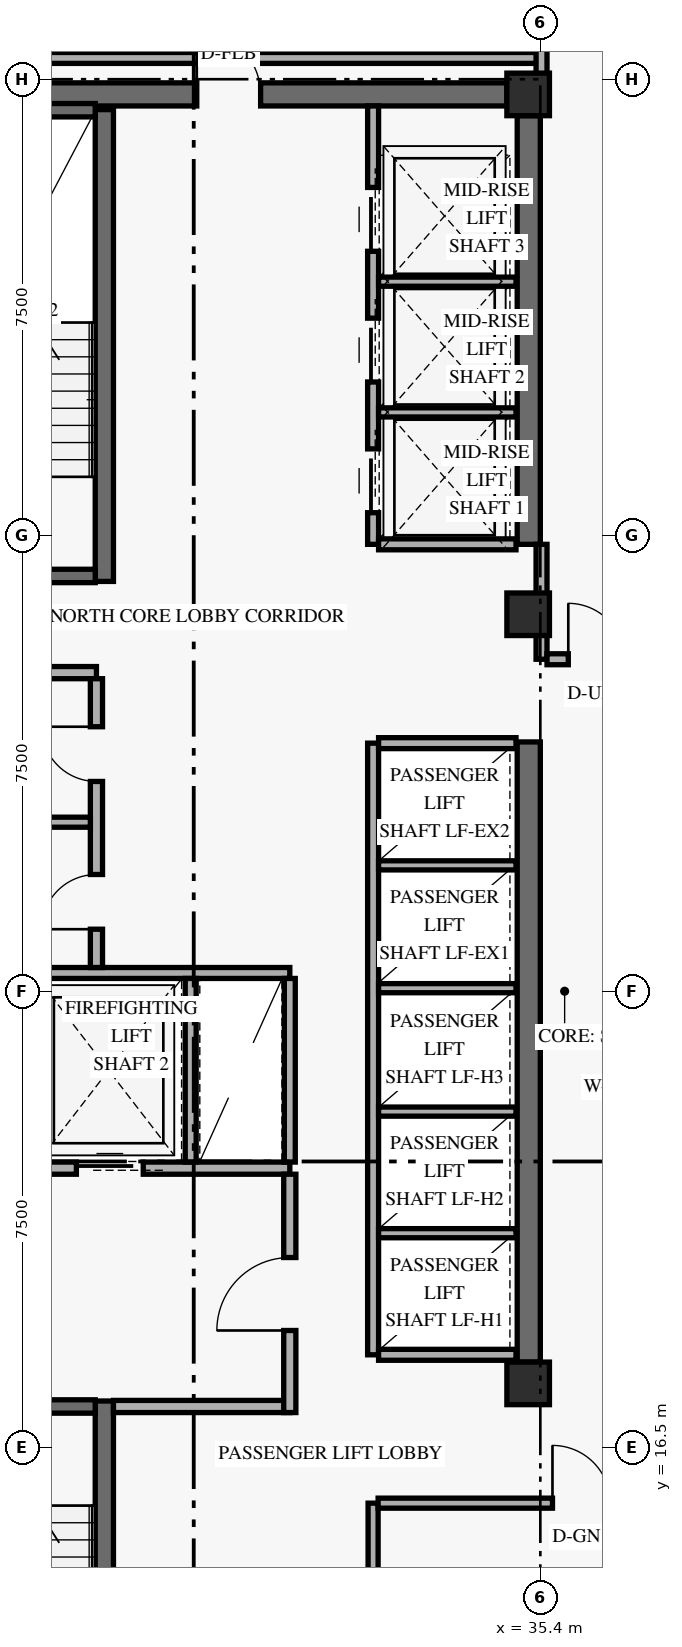
"""IFC4 building model, lengths in metres.
Left out: names, types, materials, properties, quantities, classifications, styles, units other than length and angle.
Written with IfcOpenShell. Run it as: python <this file> out.ifc"""

import sys

from ifc_helpers import new_model, si_unit, direction, frame, frame_2d, origin, origin_2d, place, context, subcontext, project, spatial, rectangle, extrude, element, fill, save


model = new_model("IFC4")
c1 = context("Model", 3, precision=1e-05, world=origin(), true_north=direction((0.0, 1.0)))
c2 = subcontext(c1, "Body", "Model", "MODEL_VIEW")
j1 = project(units=[si_unit("LENGTHUNIT", "METRE"), si_unit("PLANEANGLEUNIT", "RADIAN")], contexts=[c1])
p1 = place(None, origin())
s1 = spatial("IfcSite", under=j1, at=p1, CompositionType="ELEMENT")
p2 = place(p1, origin())
s2 = spatial("IfcBuilding", under=s1, at=p2, CompositionType="ELEMENT")
p3 = place(p2, frame((0.0, 0.0, 159.0)))
s3 = spatial("IfcBuildingStorey", under=s2, at=p3, CompositionType="ELEMENT", Elevation=159.0)
p4 = place(p3, frame((35.21, 17.9, 0.0), z_axis=(0.0, 0.0, 1.0), x_axis=(0.0, 1.0, 0.0)))
e1 = element("IfcWall", 1, at=p4, inside=s3, PredefinedType="SHEAR", context=c2, shape_type="SweptSolid", body=[
    extrude(rectangle(XDim=10.2, YDim=0.38, at=frame_2d((5.1, 0.0))), origin(), (0.0, 0.0, 1.0), 2.748),
])
p5 = place(p3, frame((35.21, 31.35, 0.0), z_axis=(0.0, 0.0, 1.0), x_axis=(0.0, 1.0, 0.0)))
e2 = element("IfcWall", 2, at=p5, inside=s3, PredefinedType="SHEAR", context=c2, shape_type="SweptSolid", body=[
    extrude(rectangle(XDim=7.05, YDim=0.38, at=frame_2d((3.525, 0.0))), origin(), (0.0, 0.0, 1.0), 2.748),
])
p6 = place(p3, frame((24.55, 38.75, 0.0), z_axis=(0.0, 0.0, 1.0), x_axis=(1.0, 0.0, 0.0)))
e3 = element("IfcWall", 3, at=p6, inside=s3, PredefinedType="SHEAR", context=c2, shape_type="SweptSolid", body=[
    extrude(rectangle(XDim=10.3, YDim=0.38, at=frame_2d((5.15, 0.0))), origin(), (0.0, 0.0, 1.0), 3.36),
])
p7 = place(p6, frame((5.2, 0.0, 0.0)))
e4 = element("IfcOpeningElement", 4, at=p7, cuts=e3, PredefinedType="OPENING", context=c2, shape_type="SweptSolid", body=[
    extrude(rectangle(XDim=1.05, YDim=2.15, at=frame_2d((0.525, 1.075))), frame((0.0, 0.2, 0.0), z_axis=(0.0, -1.0, 0.0), x_axis=(1.0, 0.0, 0.0)), (0.0, 0.0, 1.0), 0.4),
])
p8 = place(p3, frame((28.23, 9.5, 0.0), z_axis=(0.0, 0.0, 1.0), x_axis=(0.0, 1.0, 0.0)))
e5 = element("IfcWall", 5, at=p8, inside=s3, PredefinedType="SHEAR", context=c2, shape_type="SweptSolid", body=[
    extrude(rectangle(XDim=7.76, YDim=0.3, at=frame_2d((3.88, 0.0))), origin(), (0.0, 0.0, 1.0), 3.36),
])
p9 = place(p3, frame((24.92, 17.17, 0.0), z_axis=(0.0, 0.0, 1.0), x_axis=(1.0, 0.0, 0.0)))
e6 = element("IfcWall", 6, at=p9, inside=s3, PredefinedType="SHEAR", context=c2, shape_type="SweptSolid", body=[
    extrude(rectangle(XDim=3.16, YDim=0.22, at=frame_2d((1.58, 0.0))), origin(), (0.0, 0.0, 1.0), 3.36),
])
p10 = place(p9, frame((0.78, 0.0, 0.0)))
e7 = element("IfcOpeningElement", 7, at=p10, cuts=e6, PredefinedType="OPENING", context=c2, shape_type="SweptSolid", body=[
    extrude(rectangle(XDim=1.05, YDim=2.15, at=frame_2d((0.525, 1.075))), frame((0.0, 0.12, 0.0), z_axis=(0.0, -1.0, 0.0), x_axis=(1.0, 0.0, 0.0)), (0.0, 0.0, 1.0), 0.24),
])
p11 = place(p3, frame((28.23, 30.74, 0.0), z_axis=(0.0, 0.0, 1.0), x_axis=(0.0, 1.0, 0.0)))
e8 = element("IfcWall", 8, at=p11, inside=s3, PredefinedType="SHEAR", context=c2, shape_type="SweptSolid", body=[
    extrude(rectangle(XDim=7.76, YDim=0.3, at=frame_2d((3.88, 0.0))), origin(), (0.0, 0.0, 1.0), 3.36),
])
p12 = place(p3, frame((24.92, 30.83, 0.0), z_axis=(0.0, 0.0, 1.0), x_axis=(1.0, 0.0, 0.0)))
e9 = element("IfcWall", 9, at=p12, inside=s3, PredefinedType="SHEAR", context=c2, shape_type="SweptSolid", body=[
    extrude(rectangle(XDim=3.16, YDim=0.22, at=frame_2d((1.58, 0.0))), origin(), (0.0, 0.0, 1.0), 3.36),
])
p13 = place(p12, frame((0.78, 0.0, 0.0)))
e10 = element("IfcOpeningElement", 10, at=p13, cuts=e9, PredefinedType="OPENING", context=c2, shape_type="SweptSolid", body=[
    extrude(rectangle(XDim=1.05, YDim=2.15, at=frame_2d((0.525, 1.075))), frame((0.0, 0.12, 0.0), z_axis=(0.0, -1.0, 0.0), x_axis=(1.0, 0.0, 0.0)), (0.0, 0.0, 1.0), 0.24),
])
p14 = place(p3, frame((24.92, 38.49, 0.0), z_axis=(0.0, 0.0, 1.0), x_axis=(1.0, 0.0, 0.0)))
e11 = element("IfcWall", 11, at=p14, inside=s3, PredefinedType="SHEAR", context=c2, shape_type="SweptSolid", body=[
    extrude(rectangle(XDim=3.16, YDim=0.22, at=frame_2d((1.58, 0.0))), origin(), (0.0, 0.0, 1.0), 3.36),
])
for number, where, z_axis, x_axis in (
    (12, (35.2, 17.55, 0.0), (0.0, 0.0, 1.0), (1.0, 0.0, 0.0)),
    (13, (35.2, 30.2, 0.0), (0.0, 0.0, 1.0), (1.0, 0.0, 0.0)),
    (14, (35.2, 38.75, 0.0), (0.0, 0.0, 1.0), (1.0, 0.0, 0.0)),
):
    element("IfcColumn", number, at=place(p3, frame(where, z_axis=z_axis, x_axis=x_axis)), inside=s3, PredefinedType="COLUMN", context=c2, shape_type="SweptSolid", body=[
        extrude(rectangle(XDim=0.7, YDim=0.7, at=origin_2d()), origin(), (0.0, 0.0, 1.0), 3.6),
    ])
p15 = place(p3, frame((24.45, 21.09, 0.0), z_axis=(0.0, 0.0, 1.0), x_axis=(1.0, 0.0, 0.0)))
e15 = element("IfcWall", 15, at=p15, inside=s3, PredefinedType="STANDARD", context=c2, shape_type="SweptSolid", body=[
    extrude(rectangle(XDim=6.83, YDim=0.2, at=frame_2d((3.415, 0.0))), origin(), (0.0, 0.0, 1.0), 3.36),
])
p16 = place(p15, frame((0.72, 0.0, 0.0)))
e16 = element("IfcOpeningElement", 16, at=p16, cuts=e15, PredefinedType="OPENING", context=c2, shape_type="SweptSolid", body=[
    extrude(rectangle(XDim=1.1, YDim=2.2, at=frame_2d((0.55, 1.1))), frame((0.0, 0.11, 0.0), z_axis=(0.0, -1.0, 0.0), x_axis=(1.0, 0.0, 0.0)), (0.0, 0.0, 1.0), 0.22),
])
p17 = place(p15, frame((3.32, 0.0, 0.0)))
e17 = element("IfcOpeningElement", 17, at=p17, cuts=e15, PredefinedType="OPENING", context=c2, shape_type="SweptSolid", body=[
    extrude(rectangle(XDim=1.1, YDim=2.2, at=frame_2d((0.55, 1.1))), frame((0.0, 0.11, 0.0), z_axis=(0.0, -1.0, 0.0), x_axis=(1.0, 0.0, 0.0)), (0.0, 0.0, 1.0), 0.22),
])
p18 = place(p3, frame((28.38, 17.17, 0.0), z_axis=(0.0, 0.0, 1.0), x_axis=(1.0, 0.0, 0.0)))
e18 = element("IfcWall", 18, at=p18, inside=s3, PredefinedType="STANDARD", context=c2, shape_type="SweptSolid", body=[
    extrude(rectangle(XDim=2.9, YDim=0.2, at=frame_2d((1.45, 0.0))), origin(), (0.0, 0.0, 1.0), 3.36),
])
p19 = place(p3, frame((31.28, 17.07, 0.0), z_axis=(0.0, 0.0, 1.0), x_axis=(0.0, 1.0, 0.0)))
e19 = element("IfcWall", 19, at=p19, inside=s3, PredefinedType="STANDARD", context=c2, shape_type="SweptSolid", body=[
    extrude(rectangle(XDim=3.92, YDim=0.2, at=frame_2d((1.96, 0.0))), origin(), (0.0, 0.0, 1.0), 2.73),
])
p20 = place(p19, frame((1.35, 0.0, 0.0)))
e20 = element("IfcOpeningElement", 20, at=p20, cuts=e19, PredefinedType="OPENING", context=c2, shape_type="SweptSolid", body=[
    extrude(rectangle(XDim=1.2, YDim=2.15, at=frame_2d((0.6, 1.075))), frame((0.0, 0.11, 0.0), z_axis=(0.0, -1.0, 0.0), x_axis=(1.0, 0.0, 0.0)), (0.0, 0.0, 1.0), 0.22),
])
p21 = place(p3, frame((24.45, 24.3, 0.0), z_axis=(0.0, 0.0, 1.0), x_axis=(1.0, 0.0, 0.0)))
e21 = element("IfcWall", 21, at=p21, inside=s3, PredefinedType="STANDARD", context=c2, shape_type="SweptSolid", body=[
    extrude(rectangle(XDim=6.83, YDim=0.18, at=frame_2d((3.415, 0.0))), origin(), (0.0, 0.0, 1.0), 3.36),
])
for number, where, z_axis, x_axis in (
    (22, (29.65, 21.19, 0.0), (0.0, 0.0, 1.0), (0.0, 1.0, 0.0)),
    (23, (31.28, 21.19, 0.0), (0.0, 0.0, 1.0), (0.0, 1.0, 0.0)),
):
    element("IfcWall", number, at=place(p3, frame(where, z_axis=z_axis, x_axis=x_axis)), inside=s3, PredefinedType="STANDARD", context=c2, shape_type="SweptSolid", body=[
        extrude(rectangle(XDim=3.02, YDim=0.18, at=frame_2d((1.51, 0.0))), origin(), (0.0, 0.0, 1.0), 3.36),
    ])
p22 = place(p3, frame((24.45, 29.24, 0.0), z_axis=(0.0, 0.0, 1.0), x_axis=(1.0, 0.0, 0.0)))
e24 = element("IfcWall", 24, at=p22, inside=s3, PredefinedType="STANDARD", context=c2, shape_type="SweptSolid", body=[
    extrude(rectangle(XDim=3.65, YDim=0.2, at=frame_2d((1.825, 0.0))), origin(), (0.0, 0.0, 1.0), 3.36),
])
p23 = place(p3, frame((28.1, 24.39, 0.0), z_axis=(0.0, 0.0, 1.0), x_axis=(0.0, 1.0, 0.0)))
e25 = element("IfcWall", 25, at=p23, inside=s3, PredefinedType="STANDARD", context=c2, shape_type="SweptSolid", body=[
    extrude(rectangle(XDim=4.75, YDim=0.2, at=frame_2d((2.375, 0.0))), origin(), (0.0, 0.0, 1.0), 3.36),
])
p24 = place(p23, frame((0.63, 0.0, 0.0)))
e26 = element("IfcOpeningElement", 26, at=p24, cuts=e25, PredefinedType="OPENING", context=c2, shape_type="SweptSolid", body=[
    extrude(rectangle(XDim=0.9, YDim=2.1, at=frame_2d((0.45, 1.05))), frame((0.0, 0.11, 0.0), z_axis=(0.0, -1.0, 0.0), x_axis=(1.0, 0.0, 0.0)), (0.0, 0.0, 1.0), 0.22),
])
p25 = place(p23, frame((3.06, 0.0, 0.0)))
e27 = element("IfcOpeningElement", 27, at=p25, cuts=e25, PredefinedType="OPENING", context=c2, shape_type="SweptSolid", body=[
    extrude(rectangle(XDim=0.9, YDim=2.1, at=frame_2d((0.45, 1.05))), frame((0.0, 0.11, 0.0), z_axis=(0.0, -1.0, 0.0), x_axis=(1.0, 0.0, 0.0)), (0.0, 0.0, 1.0), 0.22),
])
p26 = place(p3, frame((24.45, 26.78, 0.0), z_axis=(0.0, 0.0, 1.0), x_axis=(1.0, 0.0, 0.0)))
e28 = element("IfcWall", 28, at=p26, inside=s3, PredefinedType="PARTITIONING", context=c2, shape_type="SweptSolid", body=[
    extrude(rectangle(XDim=3.55, YDim=0.165, at=frame_2d((1.775, 0.0))), origin(), (0.0, 0.0, 1.0), 3.36),
])
p27 = place(p3, frame((32.65, 18.02, 0.0), z_axis=(0.0, 0.0, 1.0), x_axis=(0.0, 1.0, 0.0)))
e29 = element("IfcWall", 29, at=p27, inside=s3, PredefinedType="STANDARD", context=c2, shape_type="SweptSolid", body=[
    extrude(rectangle(XDim=10.06, YDim=0.18, at=frame_2d((5.03, 0.0))), origin(), (0.0, 0.0, 1.0), 3.36),
])
for number, where, z_axis, x_axis in (
    (30, (32.74, 18.02, 0.0), (0.0, 0.0, 1.0), (1.0, 0.0, 0.0)),
    (31, (32.74, 28.08, 0.0), (0.0, 0.0, 1.0), (1.0, 0.0, 0.0)),
):
    element("IfcWall", number, at=place(p3, frame(where, z_axis=z_axis, x_axis=x_axis)), inside=s3, PredefinedType="STANDARD", context=c2, shape_type="SweptSolid", body=[
        extrude(rectangle(XDim=2.26, YDim=0.18, at=frame_2d((1.13, 0.0))), origin(), (0.0, 0.0, 1.0), 3.36),
    ])
for number, where, z_axis, x_axis in (
    (32, (32.74, 20.02, 0.0), (0.0, 0.0, 1.0), (1.0, 0.0, 0.0)),
    (33, (32.74, 22.02, 0.0), (0.0, 0.0, 1.0), (1.0, 0.0, 0.0)),
    (34, (32.74, 24.05, 0.0), (0.0, 0.0, 1.0), (1.0, 0.0, 0.0)),
    (35, (32.74, 26.07, 0.0), (0.0, 0.0, 1.0), (1.0, 0.0, 0.0)),
):
    element("IfcWall", number, at=place(p3, frame(where, z_axis=z_axis, x_axis=x_axis)), inside=s3, PredefinedType="STANDARD", context=c2, shape_type="SweptSolid", body=[
        extrude(rectangle(XDim=2.26, YDim=0.15, at=frame_2d((1.13, 0.0))), origin(), (0.0, 0.0, 1.0), 3.36),
    ])
p28 = place(p3, frame((32.65, 31.35, 0.0), z_axis=(0.0, 0.0, 1.0), x_axis=(0.0, 1.0, 0.0)))
e36 = element("IfcWall", 36, at=p28, inside=s3, PredefinedType="STANDARD", context=c2, shape_type="SweptSolid", body=[
    extrude(rectangle(XDim=7.21, YDim=0.18, at=frame_2d((3.605, 0.0))), origin(), (0.0, 0.0, 1.0), 3.36),
])
p29 = place(p28, frame((0.52, 0.0, 0.0)))
e37 = element("IfcOpeningElement", 37, at=p29, cuts=e36, PredefinedType="OPENING", context=c2, shape_type="SweptSolid", body=[
    extrude(rectangle(XDim=1.05, YDim=2.2, at=frame_2d((0.525, 1.1))), frame((0.0, 0.1, 0.0), z_axis=(0.0, -1.0, 0.0), x_axis=(1.0, 0.0, 0.0)), (0.0, 0.0, 1.0), 0.2),
])
p30 = place(p28, frame((2.67, 0.0, 0.0)))
e38 = element("IfcOpeningElement", 38, at=p30, cuts=e36, PredefinedType="OPENING", context=c2, shape_type="SweptSolid", body=[
    extrude(rectangle(XDim=1.05, YDim=2.2, at=frame_2d((0.525, 1.1))), frame((0.0, 0.1, 0.0), z_axis=(0.0, -1.0, 0.0), x_axis=(1.0, 0.0, 0.0)), (0.0, 0.0, 1.0), 0.2),
])
p31 = place(p28, frame((4.82, 0.0, 0.0)))
e39 = element("IfcOpeningElement", 39, at=p31, cuts=e36, PredefinedType="OPENING", context=c2, shape_type="SweptSolid", body=[
    extrude(rectangle(XDim=1.05, YDim=2.2, at=frame_2d((0.525, 1.1))), frame((0.0, 0.1, 0.0), z_axis=(0.0, -1.0, 0.0), x_axis=(1.0, 0.0, 0.0)), (0.0, 0.0, 1.0), 0.2),
])
p32 = place(p3, frame((32.74, 31.35, 0.0), z_axis=(0.0, 0.0, 1.0), x_axis=(1.0, 0.0, 0.0)))
e40 = element("IfcWall", 40, at=p32, inside=s3, PredefinedType="STANDARD", context=c2, shape_type="SweptSolid", body=[
    extrude(rectangle(XDim=2.26, YDim=0.18, at=frame_2d((1.13, 0.0))), origin(), (0.0, 0.0, 1.0), 3.36),
])
for number, where, z_axis, x_axis in (
    (41, (32.74, 33.52, 0.0), (0.0, 0.0, 1.0), (1.0, 0.0, 0.0)),
    (42, (32.74, 35.67, 0.0), (0.0, 0.0, 1.0), (1.0, 0.0, 0.0)),
):
    element("IfcWall", number, at=place(p3, frame(where, z_axis=z_axis, x_axis=x_axis)), inside=s3, PredefinedType="STANDARD", context=c2, shape_type="SweptSolid", body=[
        extrude(rectangle(XDim=2.26, YDim=0.15, at=frame_2d((1.13, 0.0))), origin(), (0.0, 0.0, 1.0), 3.36),
    ])
p33 = place(p3, frame((32.65, 9.5, 0.0), z_axis=(0.0, 0.0, 1.0), x_axis=(0.0, 1.0, 0.0)))
e43 = element("IfcWall", 43, at=p33, inside=s3, PredefinedType="PARTITIONING", context=c2, shape_type="SweptSolid", body=[
    extrude(rectangle(XDim=6.08, YDim=0.165, at=frame_2d((3.04, 0.0))), origin(), (0.0, 0.0, 1.0), 3.36),
])
p34 = place(p3, frame((32.732, 15.58, 0.0), z_axis=(0.0, 0.0, 1.0), x_axis=(1.0, 0.0, 0.0)))
e44 = element("IfcWall", 44, at=p34, inside=s3, PredefinedType="PARTITIONING", context=c2, shape_type="SweptSolid", body=[
    extrude(rectangle(XDim=4.818, YDim=0.165, at=frame_2d((2.409, 0.0))), origin(), (0.0, 0.0, 1.0), 2.73),
])
p35 = place(p34, frame((2.867, 0.0, 0.0)))
e45 = element("IfcOpeningElement", 45, at=p35, cuts=e44, PredefinedType="OPENING", context=c2, shape_type="SweptSolid", body=[
    extrude(rectangle(XDim=0.95, YDim=2.15, at=frame_2d((0.475, 1.075))), frame((0.0, 0.093, 0.0), z_axis=(0.0, -1.0, 0.0), x_axis=(1.0, 0.0, 0.0)), (0.0, 0.0, 1.0), 0.185),
])
p36 = place(p3, frame((35.42, 29.46, 0.0), z_axis=(0.0, 0.0, 1.0), x_axis=(0.0, 1.0, 0.0)))
e46 = element("IfcWall", 46, at=p36, inside=s3, PredefinedType="STANDARD", context=c2, shape_type="SweptSolid", body=[
    extrude(rectangle(XDim=1.89, YDim=0.18, at=frame_2d((0.945, 0.0))), origin(), (0.0, 0.0, 1.0), 2.73),
])
p37 = place(p3, frame((35.51, 29.46, 0.0), z_axis=(0.0, 0.0, 1.0), x_axis=(1.0, 0.0, 0.0)))
e47 = element("IfcWall", 47, at=p37, inside=s3, PredefinedType="STANDARD", context=c2, shape_type="SweptSolid", body=[
    extrude(rectangle(XDim=14.29, YDim=0.18, at=frame_2d((7.145, 0.0))), origin(), (0.0, 0.0, 1.0), 2.73),
])
p38 = place(p37, frame((0.35, 0.0, 0.0)))
e48 = element("IfcOpeningElement", 48, at=p38, cuts=e47, PredefinedType="OPENING", context=c2, shape_type="SweptSolid", body=[
    extrude(rectangle(XDim=0.92, YDim=2.15, at=frame_2d((0.46, 1.075))), frame((0.0, 0.1, 0.0), z_axis=(0.0, -1.0, 0.0), x_axis=(1.0, 0.0, 0.0)), (0.0, 0.0, 1.0), 0.2),
])
p39 = place(p37, frame((7.828, 0.0, 0.0)))
e49 = element("IfcOpeningElement", 49, at=p39, cuts=e47, PredefinedType="OPENING", context=c2, shape_type="SweptSolid", body=[
    extrude(rectangle(XDim=0.92, YDim=2.15, at=frame_2d((0.46, 1.075))), frame((0.0, 0.1, 0.0), z_axis=(0.0, -1.0, 0.0), x_axis=(1.0, 0.0, 0.0)), (0.0, 0.0, 1.0), 0.2),
])
p40 = place(p3, frame((23.85, 39.35, 0.0), z_axis=(0.0, 0.0, 1.0), x_axis=(1.0, 0.0, 0.0)))
e50 = element("IfcWall", 50, at=p40, inside=s3, PredefinedType="STANDARD", context=c2, shape_type="SweptSolid", body=[
    extrude(rectangle(XDim=11.57, YDim=0.18, at=frame_2d((5.785, 0.0))), origin(), (0.0, 0.0, 1.0), 2.73),
])
p41 = place(p3, frame((35.42, 38.75, 0.0), z_axis=(0.0, 0.0, 1.0), x_axis=(0.0, 1.0, 0.0)))
e51 = element("IfcWall", 51, at=p41, inside=s3, PredefinedType="PARTITIONING", context=c2, shape_type="SweptSolid", body=[
    extrude(rectangle(XDim=4.97, YDim=0.18, at=frame_2d((2.485, 0.0))), origin(), (0.0, 0.0, 1.0), 2.73),
])
p42 = place(p17, origin())
e52 = element("IfcDoor", 52, at=p42, inside=s3, OperationType="SLIDING_TO_LEFT", PredefinedType="DOOR", context=c2, shape_type="SweptSolid", body=[
    extrude(rectangle(XDim=1.1, YDim=2.2, at=frame_2d((0.55, 1.1))), frame((0.0, 0.025, 0.0), z_axis=(0.0, -1.0, 0.0), x_axis=(1.0, 0.0, 0.0)), (0.0, 0.0, 1.0), 0.05),
])
fill(e17, e52)
p43 = place(p20, origin())
e53 = element("IfcDoor", 53, at=p43, inside=s3, OperationType="SINGLE_SWING_LEFT", PredefinedType="DOOR", context=c2, shape_type="SweptSolid", body=[
    extrude(rectangle(XDim=1.2, YDim=2.15, at=frame_2d((0.6, 1.075))), frame((0.0, 0.025, 0.0), z_axis=(0.0, -1.0, 0.0), x_axis=(1.0, 0.0, 0.0)), (0.0, 0.0, 1.0), 0.05),
])
fill(e20, e53)
p44 = place(p24, origin())
e54 = element("IfcDoor", 54, at=p44, inside=s3, OperationType="SINGLE_SWING_LEFT", PredefinedType="DOOR", context=c2, shape_type="SweptSolid", body=[
    extrude(rectangle(XDim=0.9, YDim=2.1, at=frame_2d((0.45, 1.05))), frame((0.0, 0.025, 0.0), z_axis=(0.0, -1.0, 0.0), x_axis=(1.0, 0.0, 0.0)), (0.0, 0.0, 1.0), 0.05),
])
fill(e26, e54)
p45 = place(p25, origin())
e55 = element("IfcDoor", 55, at=p45, inside=s3, OperationType="SINGLE_SWING_RIGHT", PredefinedType="DOOR", context=c2, shape_type="SweptSolid", body=[
    extrude(rectangle(XDim=0.9, YDim=2.1, at=frame_2d((0.45, 1.05))), frame((0.0, 0.025, 0.0), z_axis=(0.0, -1.0, 0.0), x_axis=(1.0, 0.0, 0.0)), (0.0, 0.0, 1.0), 0.05),
])
fill(e27, e55)
p46 = place(p29, origin())
e56 = element("IfcDoor", 56, at=p46, inside=s3, OperationType="SLIDING_TO_LEFT", PredefinedType="DOOR", context=c2, shape_type="SweptSolid", body=[
    extrude(rectangle(XDim=1.05, YDim=2.2, at=frame_2d((0.525, 1.1))), frame((0.0, 0.025, 0.0), z_axis=(0.0, -1.0, 0.0), x_axis=(1.0, 0.0, 0.0)), (0.0, 0.0, 1.0), 0.05),
])
fill(e37, e56)
p47 = place(p30, origin())
e57 = element("IfcDoor", 57, at=p47, inside=s3, OperationType="SLIDING_TO_LEFT", PredefinedType="DOOR", context=c2, shape_type="SweptSolid", body=[
    extrude(rectangle(XDim=1.05, YDim=2.2, at=frame_2d((0.525, 1.1))), frame((0.0, 0.025, 0.0), z_axis=(0.0, -1.0, 0.0), x_axis=(1.0, 0.0, 0.0)), (0.0, 0.0, 1.0), 0.05),
])
fill(e38, e57)
p48 = place(p31, origin())
e58 = element("IfcDoor", 58, at=p48, inside=s3, OperationType="SLIDING_TO_LEFT", PredefinedType="DOOR", context=c2, shape_type="SweptSolid", body=[
    extrude(rectangle(XDim=1.05, YDim=2.2, at=frame_2d((0.525, 1.1))), frame((0.0, 0.025, 0.0), z_axis=(0.0, -1.0, 0.0), x_axis=(1.0, 0.0, 0.0)), (0.0, 0.0, 1.0), 0.05),
])
fill(e39, e58)
p49 = place(p35, origin())
e59 = element("IfcDoor", 59, at=p49, inside=s3, OperationType="SINGLE_SWING_LEFT", PredefinedType="DOOR", context=c2, shape_type="SweptSolid", body=[
    extrude(rectangle(XDim=0.95, YDim=2.15, at=frame_2d((0.475, 1.075))), frame((0.0, 0.025, 0.0), z_axis=(0.0, -1.0, 0.0), x_axis=(1.0, 0.0, 0.0)), (0.0, 0.0, 1.0), 0.05),
])
fill(e45, e59)
p50 = place(p7, frame((1.05, 0.0, 0.0), z_axis=(0.0, 0.0, 1.0), x_axis=(-1.0, 0.0, 0.0)))
e60 = element("IfcDoor", 60, at=p50, inside=s3, OperationType="SINGLE_SWING_RIGHT", PredefinedType="DOOR", context=c2, shape_type="SweptSolid", body=[
    extrude(rectangle(XDim=1.05, YDim=2.15, at=frame_2d((0.525, 1.075))), frame((0.0, 0.025, 0.0), z_axis=(0.0, -1.0, 0.0), x_axis=(1.0, 0.0, 0.0)), (0.0, 0.0, 1.0), 0.05),
])
fill(e4, e60)
p51 = place(p38, origin())
e61 = element("IfcDoor", 61, at=p51, inside=s3, OperationType="SINGLE_SWING_LEFT", PredefinedType="DOOR", context=c2, shape_type="SweptSolid", body=[
    extrude(rectangle(XDim=0.92, YDim=2.15, at=frame_2d((0.46, 1.075))), frame((0.0, 0.025, 0.0), z_axis=(0.0, -1.0, 0.0), x_axis=(1.0, 0.0, 0.0)), (0.0, 0.0, 1.0), 0.05),
])
fill(e48, e61)
save(model, sys.argv[1])
